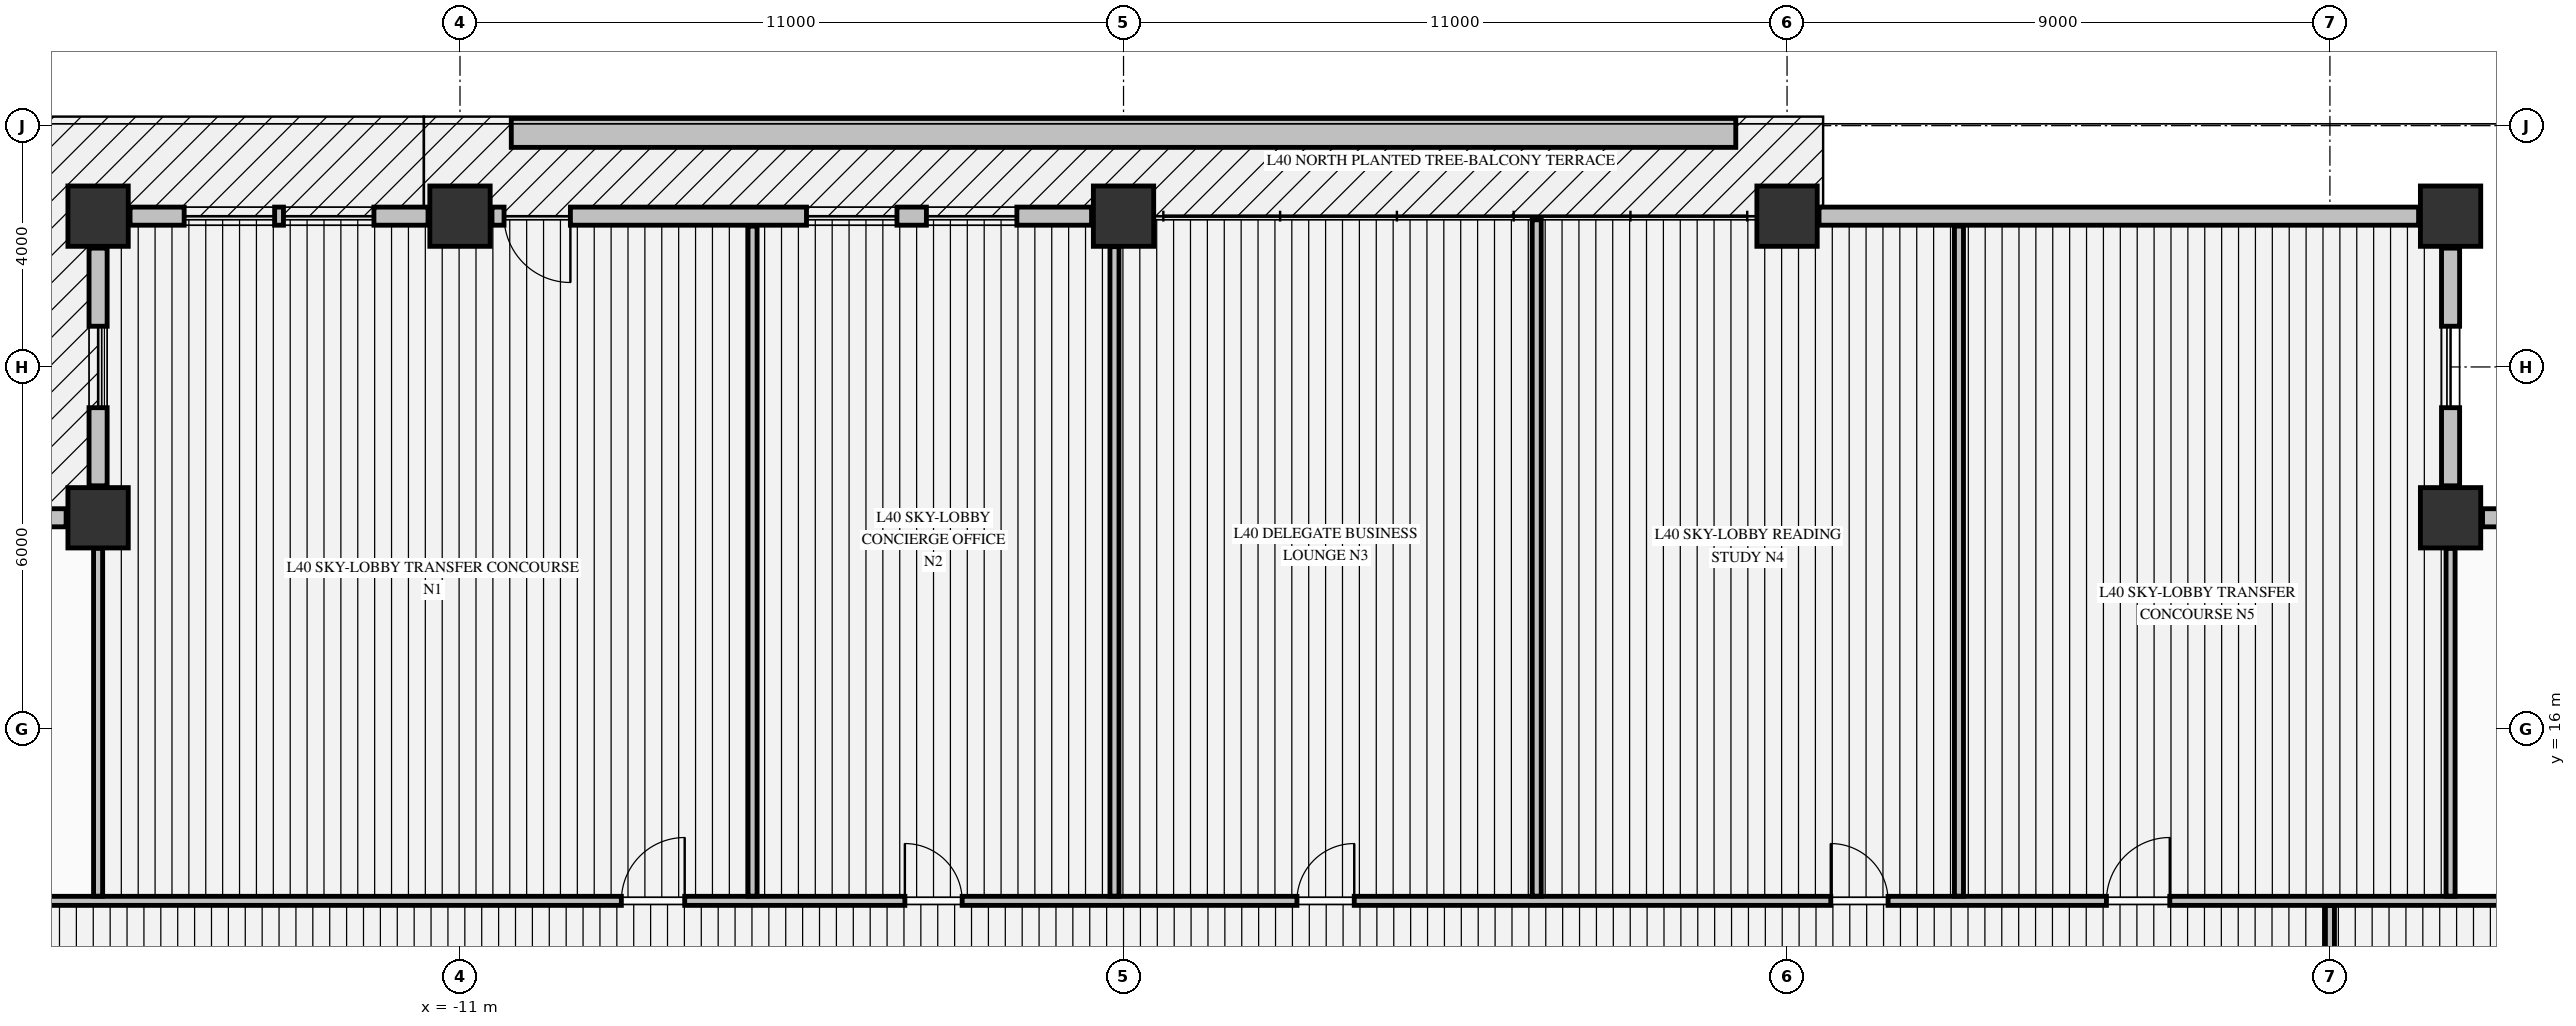
"""IFC4 building model, lengths in metres.
Left out: names, types, materials, properties, quantities, classifications, styles, units other than length and angle.
Written with IfcOpenShell. Run it as: python <this file> out.ifc"""

import sys

from ifc_helpers import new_model, si_unit, direction, frame, frame_2d, origin, origin_2d, place, context, subcontext, project, spatial, rectangle, extrude, element, fill, save


model = new_model("IFC4")
c1 = context("Model", 3, precision=1e-05, world=origin(), true_north=direction((0.0, 1.0)))
c2 = subcontext(c1, "Body", "Model", "MODEL_VIEW")
j1 = project(units=[si_unit("LENGTHUNIT", "METRE"), si_unit("PLANEANGLEUNIT", "RADIAN")], contexts=[c1])
p1 = place(None, origin())
s1 = spatial("IfcSite", under=j1, at=p1, CompositionType="ELEMENT")
p2 = place(p1, origin())
s2 = spatial("IfcBuilding", under=s1, at=p2, CompositionType="ELEMENT")
p3 = place(p2, frame((0.0, 0.0, 158.24)))
s3 = spatial("IfcBuildingStorey", under=s2, at=p3, CompositionType="ELEMENT", Elevation=158.24)
for number, where, z_axis, x_axis in (
    (1, (-17.0, 24.5, -0.425), (0.0, 0.0, 1.0), (1.0, 0.0, 0.0)),
    (2, (-11.0, 24.5, -0.425), (0.0, 0.0, 1.0), (1.0, 0.0, 0.0)),
    (3, (0.0, 24.5, -0.425), (0.0, 0.0, 1.0), (1.0, 0.0, 0.0)),
    (4, (11.0, 24.5, -0.425), (0.0, 0.0, 1.0), (1.0, 0.0, 0.0)),
    (5, (22.0, 24.5, -0.425), (0.0, 0.0, 1.0), (1.0, 0.0, 0.0)),
    (6, (22.0, 19.5, -0.425), (0.0, 0.0, 1.0), (1.0, 0.0, 0.0)),
    (7, (-17.0, 19.5, -0.425), (0.0, 0.0, 1.0), (1.0, 0.0, 0.0)),
):
    element("IfcColumn", number, at=place(p3, frame(where, z_axis=z_axis, x_axis=x_axis)), inside=s3, PredefinedType="COLUMN", context=c2, shape_type="SweptSolid", body=[
        extrude(rectangle(XDim=1.0, YDim=1.0, at=origin_2d()), origin(), (0.0, 0.0, 1.0), 4.595),
    ])
p4 = place(p3, frame((26.47, 19.5, 0.0), z_axis=(0.0, 0.0, 1.0), x_axis=(-1.0, 0.0, 0.0)))
e8 = element("IfcWall", 8, at=p4, inside=s3, PredefinedType="STANDARD", context=c2, shape_type="SweptSolid", body=[
    extrude(rectangle(XDim=3.94, YDim=0.3, at=frame_2d((1.97, 0.0))), origin(), (0.0, 0.0, 1.0), 2.362),
])
p5 = place(p4, frame((1.295, 0.0, 0.68)))
e9 = element("IfcOpeningElement", 9, at=p5, cuts=e8, PredefinedType="OPENING", context=c2, shape_type="SweptSolid", body=[
    extrude(rectangle(XDim=1.35, YDim=1.42, at=frame_2d((0.675, 0.71))), frame((0.0, 0.16, 0.0), z_axis=(0.0, -1.0, 0.0), x_axis=(1.0, 0.0, 0.0)), (0.0, 0.0, 1.0), 0.32),
])
p6 = place(p3, frame((22.0, 20.03, 0.0), z_axis=(0.0, 0.0, 1.0), x_axis=(0.0, 1.0, 0.0)))
e10 = element("IfcWall", 10, at=p6, inside=s3, PredefinedType="STANDARD", context=c2, shape_type="SweptSolid", body=[
    extrude(rectangle(XDim=3.94, YDim=0.3, at=frame_2d((1.97, 0.0))), origin(), (0.0, 0.0, 1.0), 2.362),
])
p7 = place(p6, frame((1.295, 0.0, 0.68)))
e11 = element("IfcOpeningElement", 11, at=p7, cuts=e10, PredefinedType="OPENING", context=c2, shape_type="SweptSolid", body=[
    extrude(rectangle(XDim=1.35, YDim=1.42, at=frame_2d((0.675, 0.71))), frame((0.0, 0.16, 0.0), z_axis=(0.0, -1.0, 0.0), x_axis=(1.0, 0.0, 0.0)), (0.0, 0.0, 1.0), 0.32),
])
p8 = place(p3, frame((-17.0, 23.97, 0.0), z_axis=(0.0, 0.0, 1.0), x_axis=(0.0, -1.0, 0.0)))
e12 = element("IfcWall", 12, at=p8, inside=s3, PredefinedType="STANDARD", context=c2, shape_type="SweptSolid", body=[
    extrude(rectangle(XDim=3.94, YDim=0.3, at=frame_2d((1.97, 0.0))), origin(), (0.0, 0.0, 1.0), 3.562),
])
p9 = place(p8, frame((1.295, 0.0, 0.68)))
e13 = element("IfcOpeningElement", 13, at=p9, cuts=e12, PredefinedType="OPENING", context=c2, shape_type="SweptSolid", body=[
    extrude(rectangle(XDim=1.35, YDim=1.42, at=frame_2d((0.675, 0.71))), frame((0.0, 0.16, 0.0), z_axis=(0.0, -1.0, 0.0), x_axis=(1.0, 0.0, 0.0)), (0.0, 0.0, 1.0), 0.32),
])
p10 = place(p3, frame((-17.53, 19.5, 0.0), z_axis=(0.0, 0.0, 1.0), x_axis=(-1.0, 0.0, 0.0)))
e14 = element("IfcWall", 14, at=p10, inside=s3, PredefinedType="STANDARD", context=c2, shape_type="SweptSolid", body=[
    extrude(rectangle(XDim=3.94, YDim=0.3, at=frame_2d((1.97, 0.0))), origin(), (0.0, 0.0, 1.0), 3.562),
])
p11 = place(p10, frame((1.295, 0.0, 0.68)))
e15 = element("IfcOpeningElement", 15, at=p11, cuts=e14, PredefinedType="OPENING", context=c2, shape_type="SweptSolid", body=[
    extrude(rectangle(XDim=1.35, YDim=1.42, at=frame_2d((0.675, 0.71))), frame((0.0, 0.16, 0.0), z_axis=(0.0, -1.0, 0.0), x_axis=(1.0, 0.0, 0.0)), (0.0, 0.0, 1.0), 0.32),
])
p12 = place(p3, frame((-11.53, 24.5, 0.0), z_axis=(0.0, 0.0, 1.0), x_axis=(-1.0, 0.0, 0.0)))
e16 = element("IfcWall", 16, at=p12, inside=s3, PredefinedType="STANDARD", context=c2, shape_type="SweptSolid", body=[
    extrude(rectangle(XDim=4.94, YDim=0.3, at=frame_2d((2.47, 0.0))), origin(), (0.0, 0.0, 1.0), 3.562),
])
p13 = place(p12, frame((0.897, 0.0, 0.72)))
e17 = element("IfcOpeningElement", 17, at=p13, cuts=e16, PredefinedType="OPENING", context=c2, shape_type="SweptSolid", body=[
    extrude(rectangle(XDim=1.5, YDim=1.6, at=frame_2d((0.75, 0.8))), frame((0.0, 0.16, 0.0), z_axis=(0.0, -1.0, 0.0), x_axis=(1.0, 0.0, 0.0)), (0.0, 0.0, 1.0), 0.32),
])
p14 = place(p12, frame((2.543, 0.0, 0.72)))
e18 = element("IfcOpeningElement", 18, at=p14, cuts=e16, PredefinedType="OPENING", context=c2, shape_type="SweptSolid", body=[
    extrude(rectangle(XDim=1.5, YDim=1.6, at=frame_2d((0.75, 0.8))), frame((0.0, 0.16, 0.0), z_axis=(0.0, -1.0, 0.0), x_axis=(1.0, 0.0, 0.0)), (0.0, 0.0, 1.0), 0.32),
])
p15 = place(p3, frame((-0.53, 24.5, 0.0), z_axis=(0.0, 0.0, 1.0), x_axis=(-1.0, 0.0, 0.0)))
e19 = element("IfcWall", 19, at=p15, inside=s3, PredefinedType="STANDARD", context=c2, shape_type="SweptSolid", body=[
    extrude(rectangle(XDim=9.94, YDim=0.3, at=frame_2d((4.97, 0.0))), origin(), (0.0, 0.0, 1.0), 3.562),
])
p16 = place(p15, frame((8.64, 0.0, 0.0)))
e20 = element("IfcOpeningElement", 20, at=p16, cuts=e19, PredefinedType="OPENING", context=c2, shape_type="SweptSolid", body=[
    extrude(rectangle(XDim=1.1, YDim=2.15, at=frame_2d((0.55, 1.075))), frame((0.0, 0.16, 0.0), z_axis=(0.0, -1.0, 0.0), x_axis=(1.0, 0.0, 0.0)), (0.0, 0.0, 1.0), 0.32),
])
p17 = place(p15, frame((1.238, 0.0, 0.72)))
e21 = element("IfcOpeningElement", 21, at=p17, cuts=e19, PredefinedType="OPENING", context=c2, shape_type="SweptSolid", body=[
    extrude(rectangle(XDim=1.5, YDim=1.6, at=frame_2d((0.75, 0.8))), frame((0.0, 0.16, 0.0), z_axis=(0.0, -1.0, 0.0), x_axis=(1.0, 0.0, 0.0)), (0.0, 0.0, 1.0), 0.32),
])
p18 = place(p15, frame((3.226, 0.0, 0.72)))
e22 = element("IfcOpeningElement", 22, at=p18, cuts=e19, PredefinedType="OPENING", context=c2, shape_type="SweptSolid", body=[
    extrude(rectangle(XDim=1.5, YDim=1.6, at=frame_2d((0.75, 0.8))), frame((0.0, 0.16, 0.0), z_axis=(0.0, -1.0, 0.0), x_axis=(1.0, 0.0, 0.0)), (0.0, 0.0, 1.0), 0.32),
])
p19 = place(p3, frame((21.47, 24.5, 0.0), z_axis=(0.0, 0.0, 1.0), x_axis=(-1.0, 0.0, 0.0)))
e23 = element("IfcWall", 23, at=p19, inside=s3, PredefinedType="STANDARD", context=c2, shape_type="SweptSolid", body=[
    extrude(rectangle(XDim=9.94, YDim=0.3, at=frame_2d((4.97, 0.0))), origin(), (0.0, 0.0, 1.0), 1.962),
])
p20 = place(p3, frame((-20.075, 13.15, 0.0), z_axis=(0.0, 0.0, 1.0), x_axis=(1.0, 0.0, 0.0)))
e24 = element("IfcWall", 24, at=p20, inside=s3, PredefinedType="PARTITIONING", context=c2, shape_type="SweptSolid", body=[
    extrude(rectangle(XDim=46.91, YDim=0.15, at=frame_2d((23.455, 0.0))), origin(), (0.0, 0.0, 1.0), 4.17),
])
p21 = place(p20, frame((11.75, 0.0, 0.0)))
e25 = element("IfcOpeningElement", 25, at=p21, cuts=e24, PredefinedType="OPENING", context=c2, shape_type="SweptSolid", body=[
    extrude(rectangle(XDim=1.05, YDim=2.15, at=frame_2d((0.525, 1.075))), frame((0.0, 0.085, 0.0), z_axis=(0.0, -1.0, 0.0), x_axis=(1.0, 0.0, 0.0)), (0.0, 0.0, 1.0), 0.17),
])
p22 = place(p20, frame((16.45, 0.0, 0.0)))
e26 = element("IfcOpeningElement", 26, at=p22, cuts=e24, PredefinedType="OPENING", context=c2, shape_type="SweptSolid", body=[
    extrude(rectangle(XDim=0.95, YDim=2.15, at=frame_2d((0.475, 1.075))), frame((0.0, 0.085, 0.0), z_axis=(0.0, -1.0, 0.0), x_axis=(1.0, 0.0, 0.0)), (0.0, 0.0, 1.0), 0.17),
])
p23 = place(p20, frame((22.95, 0.0, 0.0)))
e27 = element("IfcOpeningElement", 27, at=p23, cuts=e24, PredefinedType="OPENING", context=c2, shape_type="SweptSolid", body=[
    extrude(rectangle(XDim=0.95, YDim=2.15, at=frame_2d((0.475, 1.075))), frame((0.0, 0.085, 0.0), z_axis=(0.0, -1.0, 0.0), x_axis=(1.0, 0.0, 0.0)), (0.0, 0.0, 1.0), 0.17),
])
p24 = place(p20, frame((31.8, 0.0, 0.0)))
e28 = element("IfcOpeningElement", 28, at=p24, cuts=e24, PredefinedType="OPENING", context=c2, shape_type="SweptSolid", body=[
    extrude(rectangle(XDim=0.95, YDim=2.15, at=frame_2d((0.475, 1.075))), frame((0.0, 0.085, 0.0), z_axis=(0.0, -1.0, 0.0), x_axis=(1.0, 0.0, 0.0)), (0.0, 0.0, 1.0), 0.17),
])
p25 = place(p20, frame((36.37, 0.0, 0.0)))
e29 = element("IfcOpeningElement", 29, at=p25, cuts=e24, PredefinedType="OPENING", context=c2, shape_type="SweptSolid", body=[
    extrude(rectangle(XDim=1.05, YDim=2.15, at=frame_2d((0.525, 1.075))), frame((0.0, 0.085, 0.0), z_axis=(0.0, -1.0, 0.0), x_axis=(1.0, 0.0, 0.0)), (0.0, 0.0, 1.0), 0.17),
])
p26 = place(p3, frame((-17.0, 13.228, 0.0), z_axis=(0.0, 0.0, 1.0), x_axis=(0.0, 1.0, 0.0)))
e30 = element("IfcWall", 30, at=p26, inside=s3, PredefinedType="PARTITIONING", context=c2, shape_type="SweptSolid", body=[
    extrude(rectangle(XDim=5.766, YDim=0.15, at=frame_2d((2.883, 0.0))), origin(), (0.0, 0.0, 1.0), 4.17),
])
p27 = place(p3, frame((-6.15, 13.228, 0.0), z_axis=(0.0, 0.0, 1.0), x_axis=(0.0, 1.0, 0.0)))
e31 = element("IfcWall", 31, at=p27, inside=s3, PredefinedType="PARTITIONING", context=c2, shape_type="SweptSolid", body=[
    extrude(rectangle(XDim=11.107, YDim=0.15, at=frame_2d((5.553, 0.0))), origin(), (0.0, 0.0, 1.0), 4.17),
])
p28 = place(p3, frame((-0.15, 13.228, 0.0), z_axis=(0.0, 0.0, 1.0), x_axis=(0.0, 1.0, 0.0)))
e32 = element("IfcWall", 32, at=p28, inside=s3, PredefinedType="PARTITIONING", context=c2, shape_type="SweptSolid", body=[
    extrude(rectangle(XDim=10.766, YDim=0.15, at=frame_2d((5.383, 0.0))), origin(), (0.0, 0.0, 1.0), 3.185),
])
p29 = place(p3, frame((6.85, 13.228, 0.0), z_axis=(0.0, 0.0, 1.0), x_axis=(0.0, 1.0, 0.0)))
e33 = element("IfcWall", 33, at=p29, inside=s3, PredefinedType="PARTITIONING", context=c2, shape_type="SweptSolid", body=[
    extrude(rectangle(XDim=11.212, YDim=0.15, at=frame_2d((5.606, 0.0))), origin(), (0.0, 0.0, 1.0), 4.17),
])
p30 = place(p3, frame((13.85, 13.228, 0.0), z_axis=(0.0, 0.0, 1.0), x_axis=(0.0, 1.0, 0.0)))
e34 = element("IfcWall", 34, at=p30, inside=s3, PredefinedType="PARTITIONING", context=c2, shape_type="SweptSolid", body=[
    extrude(rectangle(XDim=11.107, YDim=0.15, at=frame_2d((5.553, 0.0))), origin(), (0.0, 0.0, 1.0), 4.17),
])
p31 = place(p3, frame((20.0, 10.931, 0.0), z_axis=(0.0, 0.0, 1.0), x_axis=(0.0, 1.0, 0.0)))
e35 = element("IfcWall", 35, at=p31, inside=s3, PredefinedType="PARTITIONING", context=c2, shape_type="SweptSolid", body=[
    extrude(rectangle(XDim=2.141, YDim=0.15, at=frame_2d((1.071, 0.0))), origin(), (0.0, 0.0, 1.0), 3.36),
])
p32 = place(p31, frame((0.414, 0.0, 0.0)))
e36 = element("IfcOpeningElement", 36, at=p32, cuts=e35, PredefinedType="OPENING", context=c2, shape_type="SweptSolid", body=[
    extrude(rectangle(XDim=0.95, YDim=2.15, at=frame_2d((0.475, 1.075))), frame((0.0, 0.085, 0.0), z_axis=(0.0, -1.0, 0.0), x_axis=(1.0, 0.0, 0.0)), (0.0, 0.0, 1.0), 0.17),
])
p33 = place(p3, frame((22.0, 13.228, 0.0), z_axis=(0.0, 0.0, 1.0), x_axis=(0.0, 1.0, 0.0)))
e37 = element("IfcWall", 37, at=p33, inside=s3, PredefinedType="PARTITIONING", context=c2, shape_type="SweptSolid", body=[
    extrude(rectangle(XDim=5.766, YDim=0.15, at=frame_2d((2.883, 0.0))), origin(), (0.0, 0.0, 1.0), 4.17),
])
p34 = place(p3, frame((-10.15, 25.88, -0.04), z_axis=(0.0, 0.0, 1.0), x_axis=(1.0, 0.0, 0.0)))
e38 = element("IfcWall", 38, at=p34, inside=s3, PredefinedType="PARAPET", context=c2, shape_type="SweptSolid", body=[
    extrude(rectangle(XDim=20.3, YDim=0.48, at=frame_2d((10.15, 0.0))), origin(), (0.0, 0.0, 1.0), 0.52),
])
p35 = place(p7, origin())
e39 = element("IfcWindow", 39, at=p35, inside=s3, PartitioningType="SINGLE_PANEL", PredefinedType="WINDOW", context=c2, shape_type="SweptSolid", body=[
    extrude(rectangle(XDim=1.35, YDim=1.42, at=frame_2d((0.675, 0.71))), frame((0.0, 0.03, 0.0), z_axis=(0.0, -1.0, 0.0), x_axis=(1.0, 0.0, 0.0)), (0.0, 0.0, 1.0), 0.06),
])
fill(e11, e39)
p36 = place(p9, origin())
e40 = element("IfcWindow", 40, at=p36, inside=s3, PartitioningType="SINGLE_PANEL", PredefinedType="WINDOW", context=c2, shape_type="SweptSolid", body=[
    extrude(rectangle(XDim=1.35, YDim=1.42, at=frame_2d((0.675, 0.71))), frame((0.0, 0.03, 0.0), z_axis=(0.0, -1.0, 0.0), x_axis=(1.0, 0.0, 0.0)), (0.0, 0.0, 1.0), 0.06),
])
fill(e13, e40)
p37 = place(p13, origin())
e41 = element("IfcWindow", 41, at=p37, inside=s3, PartitioningType="SINGLE_PANEL", PredefinedType="WINDOW", context=c2, shape_type="SweptSolid", body=[
    extrude(rectangle(XDim=1.5, YDim=1.6, at=frame_2d((0.75, 0.8))), frame((0.0, 0.03, 0.0), z_axis=(0.0, -1.0, 0.0), x_axis=(1.0, 0.0, 0.0)), (0.0, 0.0, 1.0), 0.06),
])
fill(e17, e41)
p38 = place(p14, origin())
e42 = element("IfcWindow", 42, at=p38, inside=s3, PartitioningType="SINGLE_PANEL", PredefinedType="WINDOW", context=c2, shape_type="SweptSolid", body=[
    extrude(rectangle(XDim=1.5, YDim=1.6, at=frame_2d((0.75, 0.8))), frame((0.0, 0.03, 0.0), z_axis=(0.0, -1.0, 0.0), x_axis=(1.0, 0.0, 0.0)), (0.0, 0.0, 1.0), 0.06),
])
fill(e18, e42)
p39 = place(p16, origin())
e43 = element("IfcDoor", 43, at=p39, inside=s3, OperationType="SINGLE_SWING_LEFT", PredefinedType="DOOR", context=c2, shape_type="SweptSolid", body=[
    extrude(rectangle(XDim=1.1, YDim=2.15, at=frame_2d((0.55, 1.075))), frame((0.0, 0.025, 0.0), z_axis=(0.0, -1.0, 0.0), x_axis=(1.0, 0.0, 0.0)), (0.0, 0.0, 1.0), 0.05),
])
fill(e20, e43)
p40 = place(p17, origin())
e44 = element("IfcWindow", 44, at=p40, inside=s3, PartitioningType="SINGLE_PANEL", PredefinedType="WINDOW", context=c2, shape_type="SweptSolid", body=[
    extrude(rectangle(XDim=1.5, YDim=1.6, at=frame_2d((0.75, 0.8))), frame((0.0, 0.03, 0.0), z_axis=(0.0, -1.0, 0.0), x_axis=(1.0, 0.0, 0.0)), (0.0, 0.0, 1.0), 0.06),
])
fill(e21, e44)
p41 = place(p18, origin())
e45 = element("IfcWindow", 45, at=p41, inside=s3, PartitioningType="SINGLE_PANEL", PredefinedType="WINDOW", context=c2, shape_type="SweptSolid", body=[
    extrude(rectangle(XDim=1.5, YDim=1.6, at=frame_2d((0.75, 0.8))), frame((0.0, 0.03, 0.0), z_axis=(0.0, -1.0, 0.0), x_axis=(1.0, 0.0, 0.0)), (0.0, 0.0, 1.0), 0.06),
])
fill(e22, e45)
p42 = place(p21, origin())
e46 = element("IfcDoor", 46, at=p42, inside=s3, OperationType="SINGLE_SWING_RIGHT", PredefinedType="DOOR", context=c2, shape_type="SweptSolid", body=[
    extrude(rectangle(XDim=1.05, YDim=2.15, at=frame_2d((0.525, 1.075))), frame((0.0, 0.025, 0.0), z_axis=(0.0, -1.0, 0.0), x_axis=(1.0, 0.0, 0.0)), (0.0, 0.0, 1.0), 0.05),
])
fill(e25, e46)
p43 = place(p22, origin())
e47 = element("IfcDoor", 47, at=p43, inside=s3, OperationType="SINGLE_SWING_LEFT", PredefinedType="DOOR", context=c2, shape_type="SweptSolid", body=[
    extrude(rectangle(XDim=0.95, YDim=2.15, at=frame_2d((0.475, 1.075))), frame((0.0, 0.025, 0.0), z_axis=(0.0, -1.0, 0.0), x_axis=(1.0, 0.0, 0.0)), (0.0, 0.0, 1.0), 0.05),
])
fill(e26, e47)
p44 = place(p23, origin())
e48 = element("IfcDoor", 48, at=p44, inside=s3, OperationType="SINGLE_SWING_RIGHT", PredefinedType="DOOR", context=c2, shape_type="SweptSolid", body=[
    extrude(rectangle(XDim=0.95, YDim=2.15, at=frame_2d((0.475, 1.075))), frame((0.0, 0.025, 0.0), z_axis=(0.0, -1.0, 0.0), x_axis=(1.0, 0.0, 0.0)), (0.0, 0.0, 1.0), 0.05),
])
fill(e27, e48)
p45 = place(p24, origin())
e49 = element("IfcDoor", 49, at=p45, inside=s3, OperationType="SINGLE_SWING_LEFT", PredefinedType="DOOR", context=c2, shape_type="SweptSolid", body=[
    extrude(rectangle(XDim=0.95, YDim=2.15, at=frame_2d((0.475, 1.075))), frame((0.0, 0.025, 0.0), z_axis=(0.0, -1.0, 0.0), x_axis=(1.0, 0.0, 0.0)), (0.0, 0.0, 1.0), 0.05),
])
fill(e28, e49)
p46 = place(p25, origin())
e50 = element("IfcDoor", 50, at=p46, inside=s3, OperationType="SINGLE_SWING_RIGHT", PredefinedType="DOOR", context=c2, shape_type="SweptSolid", body=[
    extrude(rectangle(XDim=1.05, YDim=2.15, at=frame_2d((0.525, 1.075))), frame((0.0, 0.025, 0.0), z_axis=(0.0, -1.0, 0.0), x_axis=(1.0, 0.0, 0.0)), (0.0, 0.0, 1.0), 0.05),
])
fill(e29, e50)
save(model, sys.argv[1])
